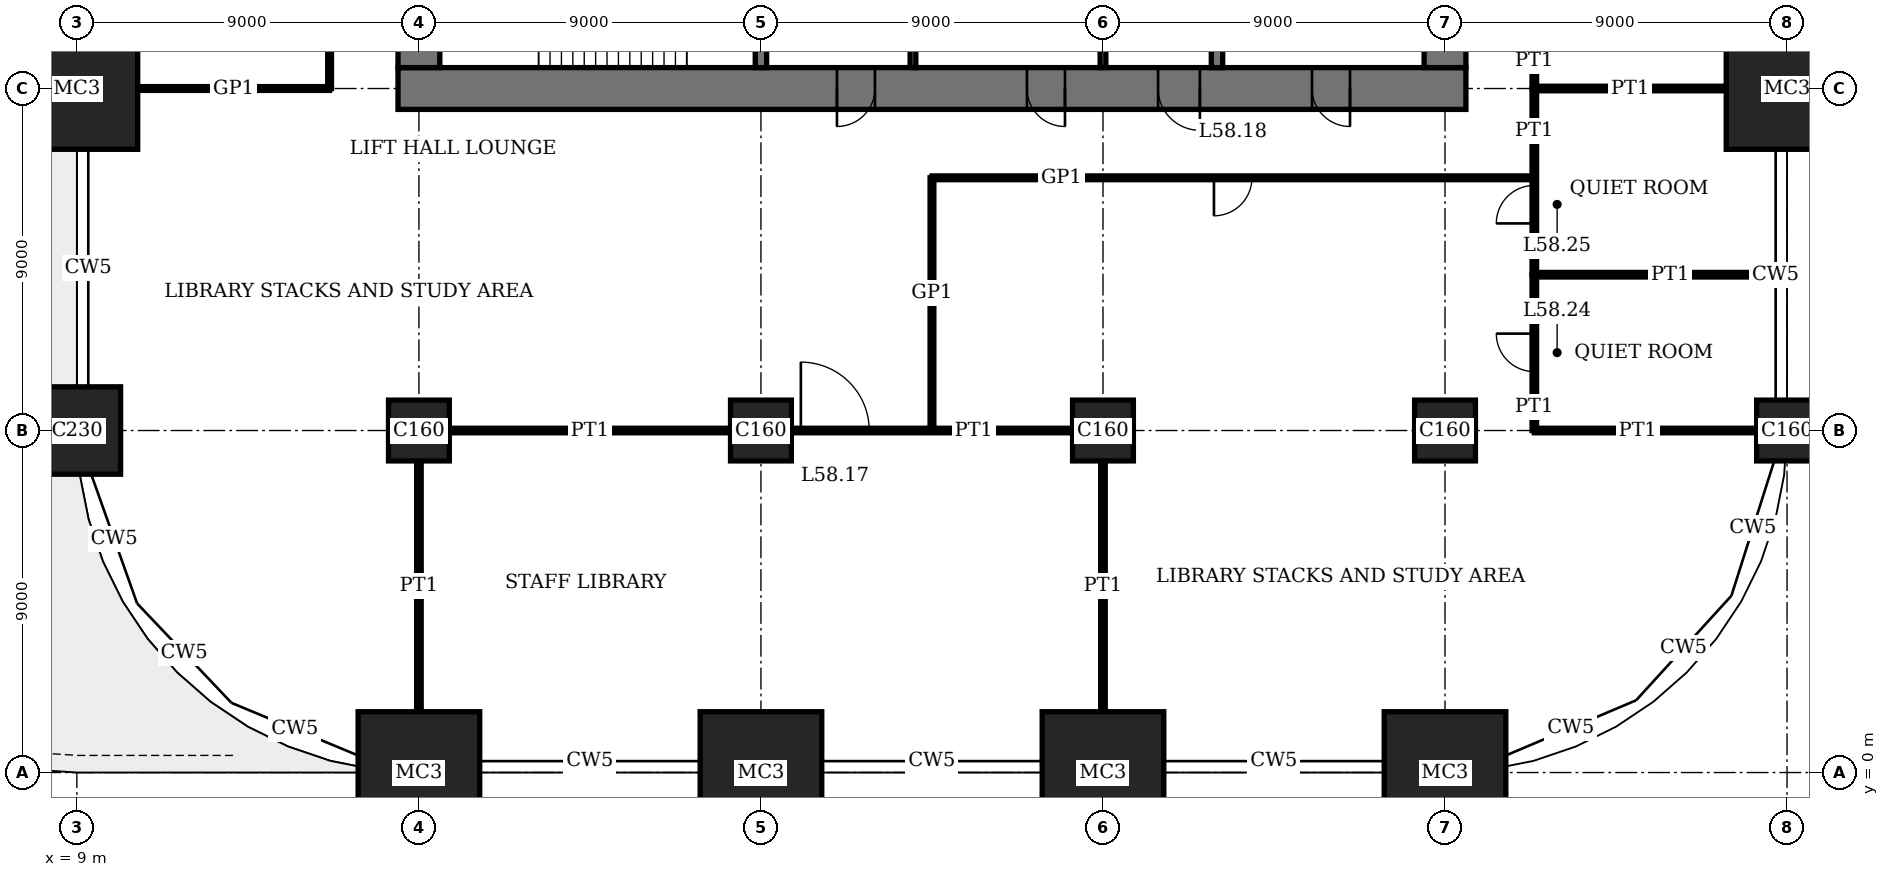
"""IFC4 building model, lengths in metres.
Left out: names, types, materials, properties, quantities, classifications, styles, units other than length and angle.
Written with IfcOpenShell. Run it as: python <this file> out.ifc"""

import sys

from ifc_helpers import new_model, si_unit, direction, frame, frame_2d, origin, origin_2d, place, context, subcontext, project, spatial, rectangle, extrude, element, fill, save


model = new_model("IFC4")
c1 = context("Model", 3, precision=1e-05, world=origin(), true_north=direction((0.0, 1.0)))
c2 = subcontext(c1, "Body", "Model", "MODEL_VIEW")
j1 = project(units=[si_unit("LENGTHUNIT", "METRE"), si_unit("PLANEANGLEUNIT", "RADIAN")], contexts=[c1])
p1 = place(None, origin())
s1 = spatial("IfcSite", under=j1, at=p1, CompositionType="ELEMENT")
p2 = place(p1, origin())
s2 = spatial("IfcBuilding", under=s1, at=p2, CompositionType="ELEMENT")
p3 = place(p2, frame((0.0, 0.0, 239.4)))
s3 = spatial("IfcBuildingStorey", under=s2, at=p3, CompositionType="ELEMENT", Elevation=239.4)
p4 = place(p3, frame((9.0, 9.0, 0.0), z_axis=(0.0, 0.0, 1.0), x_axis=(1.0, 0.0, 0.0)))
e1 = element("IfcColumn", 1, at=p4, inside=s3, PredefinedType="COLUMN", context=c2, shape_type="SweptSolid", body=[
    extrude(rectangle(XDim=2.3, YDim=2.3, at=origin_2d()), origin(), (0.0, 0.0, 1.0), 4.0),
])
for number, where, z_axis, x_axis in (
    (2, (9.0, 18.0, 0.0), (0.0, 0.0, 1.0), (1.0, 0.0, 0.0)),
    (3, (18.0, 0.0, 0.0), (0.0, 0.0, 1.0), (1.0, 0.0, 0.0)),
):
    element("IfcColumn", number, at=place(p3, frame(where, z_axis=z_axis, x_axis=x_axis)), inside=s3, PredefinedType="COLUMN", context=c2, shape_type="SweptSolid", body=[
        extrude(rectangle(XDim=3.2, YDim=3.2, at=origin_2d()), origin(), (0.0, 0.0, 1.0), 4.0),
    ])
p5 = place(p3, frame((18.0, 9.0, 0.0), z_axis=(0.0, 0.0, 1.0), x_axis=(1.0, 0.0, 0.0)))
e4 = element("IfcColumn", 4, at=p5, inside=s3, PredefinedType="COLUMN", context=c2, shape_type="SweptSolid", body=[
    extrude(rectangle(XDim=1.6, YDim=1.6, at=origin_2d()), origin(), (0.0, 0.0, 1.0), 4.0),
])
p6 = place(p3, frame((27.0, 0.0, 0.0), z_axis=(0.0, 0.0, 1.0), x_axis=(1.0, 0.0, 0.0)))
e5 = element("IfcColumn", 5, at=p6, inside=s3, PredefinedType="COLUMN", context=c2, shape_type="SweptSolid", body=[
    extrude(rectangle(XDim=3.2, YDim=3.2, at=origin_2d()), origin(), (0.0, 0.0, 1.0), 4.0),
])
p7 = place(p3, frame((27.0, 9.0, 0.0), z_axis=(0.0, 0.0, 1.0), x_axis=(1.0, 0.0, 0.0)))
e6 = element("IfcColumn", 6, at=p7, inside=s3, PredefinedType="COLUMN", context=c2, shape_type="SweptSolid", body=[
    extrude(rectangle(XDim=1.6, YDim=1.6, at=origin_2d()), origin(), (0.0, 0.0, 1.0), 4.0),
])
p8 = place(p3, frame((36.0, 0.0, 0.0), z_axis=(0.0, 0.0, 1.0), x_axis=(1.0, 0.0, 0.0)))
e7 = element("IfcColumn", 7, at=p8, inside=s3, PredefinedType="COLUMN", context=c2, shape_type="SweptSolid", body=[
    extrude(rectangle(XDim=3.2, YDim=3.2, at=origin_2d()), origin(), (0.0, 0.0, 1.0), 4.0),
])
p9 = place(p3, frame((36.0, 9.0, 0.0), z_axis=(0.0, 0.0, 1.0), x_axis=(1.0, 0.0, 0.0)))
e8 = element("IfcColumn", 8, at=p9, inside=s3, PredefinedType="COLUMN", context=c2, shape_type="SweptSolid", body=[
    extrude(rectangle(XDim=1.6, YDim=1.6, at=origin_2d()), origin(), (0.0, 0.0, 1.0), 4.0),
])
p10 = place(p3, frame((45.0, 0.0, 0.0), z_axis=(0.0, 0.0, 1.0), x_axis=(1.0, 0.0, 0.0)))
e9 = element("IfcColumn", 9, at=p10, inside=s3, PredefinedType="COLUMN", context=c2, shape_type="SweptSolid", body=[
    extrude(rectangle(XDim=3.2, YDim=3.2, at=origin_2d()), origin(), (0.0, 0.0, 1.0), 4.0),
])
for number, where, z_axis, x_axis in (
    (10, (45.0, 9.0, 0.0), (0.0, 0.0, 1.0), (1.0, 0.0, 0.0)),
    (11, (54.0, 9.0, 0.0), (0.0, 0.0, 1.0), (1.0, 0.0, 0.0)),
):
    element("IfcColumn", number, at=place(p3, frame(where, z_axis=z_axis, x_axis=x_axis)), inside=s3, PredefinedType="COLUMN", context=c2, shape_type="SweptSolid", body=[
        extrude(rectangle(XDim=1.6, YDim=1.6, at=origin_2d()), origin(), (0.0, 0.0, 1.0), 4.0),
    ])
p11 = place(p3, frame((54.0, 18.0, 0.0), z_axis=(0.0, 0.0, 1.0), x_axis=(1.0, 0.0, 0.0)))
e12 = element("IfcColumn", 12, at=p11, inside=s3, PredefinedType="COLUMN", context=c2, shape_type="SweptSolid", body=[
    extrude(rectangle(XDim=3.2, YDim=3.2, at=origin_2d()), origin(), (0.0, 0.0, 1.0), 4.0),
])
p12 = place(p3, frame((17.45, 18.0, 0.0), z_axis=(0.0, 0.0, 1.0), x_axis=(1.0, 0.0, 0.0)))
e13 = element("IfcWall", 13, at=p12, inside=s3, PredefinedType="SHEAR", context=c2, shape_type="SweptSolid", body=[
    extrude(rectangle(XDim=28.1, YDim=1.1, at=frame_2d((14.05, 0.0))), origin(), (0.0, 0.0, 1.0), 4.0),
])
p13 = place(p12, frame((11.55, 0.0, 0.0)))
e14 = element("IfcOpeningElement", 14, at=p13, cuts=e13, PredefinedType="OPENING", context=c2, shape_type="SweptSolid", body=[
    extrude(rectangle(XDim=1.0, YDim=2.4, at=frame_2d((0.5, 1.2))), frame((0.0, 0.56, 0.0), z_axis=(0.0, -1.0, 0.0), x_axis=(1.0, 0.0, 0.0)), (0.0, 0.0, 1.0), 1.12),
])
p14 = place(p12, frame((16.55, 0.0, 0.0)))
e15 = element("IfcOpeningElement", 15, at=p14, cuts=e13, PredefinedType="OPENING", context=c2, shape_type="SweptSolid", body=[
    extrude(rectangle(XDim=1.0, YDim=2.4, at=frame_2d((0.5, 1.2))), frame((0.0, 0.56, 0.0), z_axis=(0.0, -1.0, 0.0), x_axis=(1.0, 0.0, 0.0)), (0.0, 0.0, 1.0), 1.12),
])
p15 = place(p12, frame((20.0, 0.0, 0.0)))
e16 = element("IfcOpeningElement", 16, at=p15, cuts=e13, PredefinedType="OPENING", context=c2, shape_type="SweptSolid", body=[
    extrude(rectangle(XDim=1.1, YDim=2.4, at=frame_2d((0.55, 1.2))), frame((0.0, 0.56, 0.0), z_axis=(0.0, -1.0, 0.0), x_axis=(1.0, 0.0, 0.0)), (0.0, 0.0, 1.0), 1.12),
])
p16 = place(p12, frame((24.05, 0.0, 0.0)))
e17 = element("IfcOpeningElement", 17, at=p16, cuts=e13, PredefinedType="OPENING", context=c2, shape_type="SweptSolid", body=[
    extrude(rectangle(XDim=1.0, YDim=2.4, at=frame_2d((0.5, 1.2))), frame((0.0, 0.56, 0.0), z_axis=(0.0, -1.0, 0.0), x_axis=(1.0, 0.0, 0.0)), (0.0, 0.0, 1.0), 1.12),
])
p17 = place(p3, frame((18.0, 35.45, 0.0), z_axis=(0.0, 0.0, 1.0), x_axis=(0.0, -1.0, 0.0)))
e18 = element("IfcWall", 18, at=p17, inside=s3, PredefinedType="SHEAR", context=c2, shape_type="SweptSolid", body=[
    extrude(rectangle(XDim=16.9, YDim=1.1, at=frame_2d((8.45, 0.0))), origin(), (0.0, 0.0, 1.0), 4.0),
])
p18 = place(p17, frame((8.9, 0.0, 0.0)))
e19 = element("IfcOpeningElement", 19, at=p18, cuts=e18, PredefinedType="OPENING", context=c2, shape_type="SweptSolid", body=[
    extrude(rectangle(XDim=1.8, YDim=2.4, at=frame_2d((0.9, 1.2))), frame((0.0, 0.56, 0.0), z_axis=(0.0, -1.0, 0.0), x_axis=(1.0, 0.0, 0.0)), (0.0, 0.0, 1.0), 1.12),
])
p19 = place(p3, frame((45.0, 18.55, 0.0), z_axis=(0.0, 0.0, 1.0), x_axis=(0.0, 1.0, 0.0)))
e20 = element("IfcWall", 20, at=p19, inside=s3, PredefinedType="SHEAR", context=c2, shape_type="SweptSolid", body=[
    extrude(rectangle(XDim=16.9, YDim=1.1, at=frame_2d((8.45, 0.0))), origin(), (0.0, 0.0, 1.0), 4.0),
])
p20 = place(p19, frame((8.9, 0.0, 0.0)))
e21 = element("IfcOpeningElement", 21, at=p20, cuts=e20, PredefinedType="OPENING", context=c2, shape_type="SweptSolid", body=[
    extrude(rectangle(XDim=1.8, YDim=2.4, at=frame_2d((0.9, 1.2))), frame((0.0, 0.56, 0.0), z_axis=(0.0, -1.0, 0.0), x_axis=(1.0, 0.0, 0.0)), (0.0, 0.0, 1.0), 1.12),
])
p21 = place(p3, frame((27.0, 18.55, 0.0), z_axis=(0.0, 0.0, 1.0), x_axis=(0.0, 1.0, 0.0)))
e22 = element("IfcWall", 22, at=p21, inside=s3, PredefinedType="SHEAR", context=c2, shape_type="SweptSolid", body=[
    extrude(rectangle(XDim=3.05, YDim=0.3, at=frame_2d((1.525, 0.0))), origin(), (0.0, 0.0, 1.0), 4.0),
])
p22 = place(p3, frame((39.0, 18.55, 0.0), z_axis=(0.0, 0.0, 1.0), x_axis=(0.0, 1.0, 0.0)))
e23 = element("IfcWall", 23, at=p22, inside=s3, PredefinedType="SHEAR", context=c2, shape_type="SweptSolid", body=[
    extrude(rectangle(XDim=5.9, YDim=0.3, at=frame_2d((2.95, 0.0))), origin(), (0.0, 0.0, 1.0), 4.0),
])
p23 = place(p3, frame((18.8, 9.0, 0.0), z_axis=(0.0, 0.0, 1.0), x_axis=(1.0, 0.0, 0.0)))
e24 = element("IfcWall", 24, at=p23, inside=s3, PredefinedType="PARTITIONING", context=c2, shape_type="SweptSolid", body=[
    extrude(rectangle(XDim=7.4, YDim=0.12, at=frame_2d((3.7, 0.0))), origin(), (0.0, 0.0, 1.0), 3.05),
])
p24 = place(p3, frame((27.8, 9.0, 0.0), z_axis=(0.0, 0.0, 1.0), x_axis=(1.0, 0.0, 0.0)))
e25 = element("IfcWall", 25, at=p24, inside=s3, PredefinedType="PARTITIONING", context=c2, shape_type="SweptSolid", body=[
    extrude(rectangle(XDim=7.4, YDim=0.12, at=frame_2d((3.7, 0.0))), origin(), (0.0, 0.0, 1.0), 3.05),
])
p25 = place(p24, frame((0.25, 0.0, 0.0)))
e26 = element("IfcOpeningElement", 26, at=p25, cuts=e25, PredefinedType="OPENING", context=c2, shape_type="SweptSolid", body=[
    extrude(rectangle(XDim=1.8, YDim=2.4, at=frame_2d((0.9, 1.2))), frame((0.0, 0.07, 0.0), z_axis=(0.0, -1.0, 0.0), x_axis=(1.0, 0.0, 0.0)), (0.0, 0.0, 1.0), 0.14),
])
p26 = place(p3, frame((47.35, 9.0, 0.0), z_axis=(0.0, 0.0, 1.0), x_axis=(1.0, 0.0, 0.0)))
e27 = element("IfcWall", 27, at=p26, inside=s3, PredefinedType="PARTITIONING", context=c2, shape_type="SweptSolid", body=[
    extrude(rectangle(XDim=5.85, YDim=0.12, at=frame_2d((2.925, 0.0))), origin(), (0.0, 0.0, 1.0), 3.05),
])
p27 = place(p3, frame((47.35, 13.1, 0.0), z_axis=(0.0, 0.0, 1.0), x_axis=(1.0, 0.0, 0.0)))
e28 = element("IfcWall", 28, at=p27, inside=s3, PredefinedType="PARTITIONING", context=c2, shape_type="SweptSolid", body=[
    extrude(rectangle(XDim=6.34, YDim=0.12, at=frame_2d((3.17, 0.0))), origin(), (0.0, 0.0, 1.0), 3.75),
])
p28 = place(p3, frame((31.5, 15.65, 0.0), z_axis=(0.0, 0.0, 1.0), x_axis=(1.0, 0.0, 0.0)))
e29 = element("IfcWall", 29, at=p28, inside=s3, PredefinedType="PARTITIONING", context=c2, shape_type="SweptSolid", body=[
    extrude(rectangle(XDim=15.84, YDim=0.1, at=frame_2d((7.92, 0.0))), origin(), (0.0, 0.0, 1.0), 3.75),
])
p29 = place(p28, frame((7.42, 0.0, 0.0)))
e30 = element("IfcOpeningElement", 30, at=p29, cuts=e29, PredefinedType="OPENING", context=c2, shape_type="SweptSolid", body=[
    extrude(rectangle(XDim=1.0, YDim=2.4, at=frame_2d((0.5, 1.2))), frame((0.0, 0.06, 0.0), z_axis=(0.0, -1.0, 0.0), x_axis=(1.0, 0.0, 0.0)), (0.0, 0.0, 1.0), 0.12),
])
p30 = place(p3, frame((47.35, 18.0, 0.0), z_axis=(0.0, 0.0, 1.0), x_axis=(1.0, 0.0, 0.0)))
e31 = element("IfcWall", 31, at=p30, inside=s3, PredefinedType="PARTITIONING", context=c2, shape_type="SweptSolid", body=[
    extrude(rectangle(XDim=5.05, YDim=0.12, at=frame_2d((2.525, 0.0))), origin(), (0.0, 0.0, 1.0), 3.05),
])
p31 = place(p3, frame((10.6, 18.0, 0.0), z_axis=(0.0, 0.0, 1.0), x_axis=(1.0, 0.0, 0.0)))
e32 = element("IfcWall", 32, at=p31, inside=s3, PredefinedType="PARTITIONING", context=c2, shape_type="SweptSolid", body=[
    extrude(rectangle(XDim=5.05, YDim=0.1, at=frame_2d((2.525, 0.0))), origin(), (0.0, 0.0, 1.0), 3.05),
])
p32 = place(p3, frame((15.65, 18.0, 0.0), z_axis=(0.0, 0.0, 1.0), x_axis=(0.0, 1.0, 0.0)))
e33 = element("IfcWall", 33, at=p32, inside=s3, PredefinedType="PARTITIONING", context=c2, shape_type="SweptSolid", body=[
    extrude(rectangle(XDim=9.0, YDim=0.1, at=frame_2d((4.5, 0.0))), origin(), (0.0, 0.0, 1.0), 3.75),
])
p33 = place(p32, frame((4.0, 0.0, 0.0)))
e34 = element("IfcOpeningElement", 34, at=p33, cuts=e33, PredefinedType="OPENING", context=c2, shape_type="SweptSolid", body=[
    extrude(rectangle(XDim=1.0, YDim=2.4, at=frame_2d((0.5, 1.2))), frame((0.0, 0.06, 0.0), z_axis=(0.0, -1.0, 0.0), x_axis=(1.0, 0.0, 0.0)), (0.0, 0.0, 1.0), 0.12),
])
p34 = place(p3, frame((18.0, 1.6, 0.0), z_axis=(0.0, 0.0, 1.0), x_axis=(0.0, 1.0, 0.0)))
e35 = element("IfcWall", 35, at=p34, inside=s3, PredefinedType="PARTITIONING", context=c2, shape_type="SweptSolid", body=[
    extrude(rectangle(XDim=6.6, YDim=0.12, at=frame_2d((3.3, 0.0))), origin(), (0.0, 0.0, 1.0), 3.05),
])
p35 = place(p3, frame((31.5, 8.99, 0.0), z_axis=(0.0, 0.0, 1.0), x_axis=(0.0, 1.0, 0.0)))
e36 = element("IfcWall", 36, at=p35, inside=s3, PredefinedType="PARTITIONING", context=c2, shape_type="SweptSolid", body=[
    extrude(rectangle(XDim=6.66, YDim=0.1, at=frame_2d((3.33, 0.0))), origin(), (0.0, 0.0, 1.0), 3.75),
])
p36 = place(p3, frame((36.0, 1.6, 0.0), z_axis=(0.0, 0.0, 1.0), x_axis=(0.0, 1.0, 0.0)))
e37 = element("IfcWall", 37, at=p36, inside=s3, PredefinedType="PARTITIONING", context=c2, shape_type="SweptSolid", body=[
    extrude(rectangle(XDim=6.6, YDim=0.12, at=frame_2d((3.3, 0.0))), origin(), (0.0, 0.0, 1.0), 3.05),
])
p37 = place(p3, frame((47.35, 9.0, 0.0), z_axis=(0.0, 0.0, 1.0), x_axis=(0.0, 1.0, 0.0)))
e38 = element("IfcWall", 38, at=p37, inside=s3, PredefinedType="PARTITIONING", context=c2, shape_type="SweptSolid", body=[
    extrude(rectangle(XDim=4.1, YDim=0.12, at=frame_2d((2.05, 0.0))), origin(), (0.0, 0.0, 1.0), 3.75),
])
p38 = place(p37, frame((1.55, 0.0, 0.0)))
e39 = element("IfcOpeningElement", 39, at=p38, cuts=e38, PredefinedType="OPENING", context=c2, shape_type="SweptSolid", body=[
    extrude(rectangle(XDim=1.0, YDim=2.4, at=frame_2d((0.5, 1.2))), frame((0.0, 0.07, 0.0), z_axis=(0.0, -1.0, 0.0), x_axis=(1.0, 0.0, 0.0)), (0.0, 0.0, 1.0), 0.14),
])
p39 = place(p3, frame((47.35, 13.1, 0.0), z_axis=(0.0, 0.0, 1.0), x_axis=(0.0, 1.0, 0.0)))
e40 = element("IfcWall", 40, at=p39, inside=s3, PredefinedType="PARTITIONING", context=c2, shape_type="SweptSolid", body=[
    extrude(rectangle(XDim=4.9, YDim=0.12, at=frame_2d((2.45, 0.0))), origin(), (0.0, 0.0, 1.0), 3.75),
])
p40 = place(p39, frame((1.35, 0.0, 0.0)))
e41 = element("IfcOpeningElement", 41, at=p40, cuts=e40, PredefinedType="OPENING", context=c2, shape_type="SweptSolid", body=[
    extrude(rectangle(XDim=1.0, YDim=2.4, at=frame_2d((0.5, 1.2))), frame((0.0, 0.07, 0.0), z_axis=(0.0, -1.0, 0.0), x_axis=(1.0, 0.0, 0.0)), (0.0, 0.0, 1.0), 0.14),
])
p41 = place(p3, frame((47.35, 18.0, 0.0), z_axis=(0.0, 0.0, 1.0), x_axis=(0.0, 1.0, 0.0)))
e42 = element("IfcWall", 42, at=p41, inside=s3, PredefinedType="PARTITIONING", context=c2, shape_type="SweptSolid", body=[
    extrude(rectangle(XDim=4.5, YDim=0.12, at=frame_2d((2.25, 0.0))), origin(), (0.0, 0.0, 1.0), 3.75),
])
p42 = place(p41, frame((1.75, 0.0, 0.0)))
e43 = element("IfcOpeningElement", 43, at=p42, cuts=e42, PredefinedType="OPENING", context=c2, shape_type="SweptSolid", body=[
    extrude(rectangle(XDim=1.0, YDim=2.4, at=frame_2d((0.5, 1.2))), frame((0.0, 0.07, 0.0), z_axis=(0.0, -1.0, 0.0), x_axis=(1.0, 0.0, 0.0)), (0.0, 0.0, 1.0), 0.14),
])
for number, where, z_axis, x_axis in (
    (44, (31.0, 18.55, 0.0), (0.0, 0.0, 1.0), (0.0, 1.0, 0.0)),
    (45, (36.0, 18.55, 0.0), (0.0, 0.0, 1.0), (0.0, 1.0, 0.0)),
):
    element("IfcWall", number, at=place(p3, frame(where, z_axis=z_axis, x_axis=x_axis)), inside=s3, PredefinedType="PARTITIONING", context=c2, shape_type="SweptSolid", body=[
        extrude(rectangle(XDim=2.9, YDim=0.15, at=frame_2d((1.45, 0.0))), origin(), (0.0, 0.0, 1.0), 3.75),
    ])
p43 = place(p13, origin())
e46 = element("IfcDoor", 46, at=p43, inside=s3, OperationType="SINGLE_SWING_LEFT", PredefinedType="DOOR", context=c2, shape_type="SweptSolid", body=[
    extrude(rectangle(XDim=1.0, YDim=2.4, at=frame_2d((0.5, 1.2))), frame((0.0, 0.025, 0.0), z_axis=(0.0, -1.0, 0.0), x_axis=(1.0, 0.0, 0.0)), (0.0, 0.0, 1.0), 0.05),
    extrude(rectangle(XDim=0.04, YDim=2.4, at=frame_2d((0.02, 1.2))), frame((0.0, 0.4, 0.0), z_axis=(0.0, -1.0, 0.0), x_axis=(1.0, 0.0, 0.0)), (0.0, 0.0, 1.0), 0.8),
    extrude(rectangle(XDim=0.04, YDim=2.4, at=frame_2d((0.98, 1.2))), frame((0.0, 0.4, 0.0), z_axis=(0.0, -1.0, 0.0), x_axis=(1.0, 0.0, 0.0)), (0.0, 0.0, 1.0), 0.8),
    extrude(rectangle(XDim=1.0, YDim=0.04, at=frame_2d((0.5, 2.38))), frame((0.0, 0.4, 0.0), z_axis=(0.0, -1.0, 0.0), x_axis=(1.0, 0.0, 0.0)), (0.0, 0.0, 1.0), 0.8),
])
fill(e14, e46)
p44 = place(p14, origin())
e47 = element("IfcDoor", 47, at=p44, inside=s3, OperationType="SINGLE_SWING_RIGHT", PredefinedType="DOOR", context=c2, shape_type="SweptSolid", body=[
    extrude(rectangle(XDim=1.0, YDim=2.4, at=frame_2d((0.5, 1.2))), frame((0.0, 0.025, 0.0), z_axis=(0.0, -1.0, 0.0), x_axis=(1.0, 0.0, 0.0)), (0.0, 0.0, 1.0), 0.05),
    extrude(rectangle(XDim=0.04, YDim=2.4, at=frame_2d((0.02, 1.2))), frame((0.0, 0.4, 0.0), z_axis=(0.0, -1.0, 0.0), x_axis=(1.0, 0.0, 0.0)), (0.0, 0.0, 1.0), 0.8),
    extrude(rectangle(XDim=0.04, YDim=2.4, at=frame_2d((0.98, 1.2))), frame((0.0, 0.4, 0.0), z_axis=(0.0, -1.0, 0.0), x_axis=(1.0, 0.0, 0.0)), (0.0, 0.0, 1.0), 0.8),
    extrude(rectangle(XDim=1.0, YDim=0.04, at=frame_2d((0.5, 2.38))), frame((0.0, 0.4, 0.0), z_axis=(0.0, -1.0, 0.0), x_axis=(1.0, 0.0, 0.0)), (0.0, 0.0, 1.0), 0.8),
])
fill(e15, e47)
p45 = place(p15, origin())
e48 = element("IfcDoor", 48, at=p45, inside=s3, OperationType="SINGLE_SWING_RIGHT", PredefinedType="DOOR", context=c2, shape_type="SweptSolid", body=[
    extrude(rectangle(XDim=1.1, YDim=2.4, at=frame_2d((0.55, 1.2))), frame((0.0, 0.025, 0.0), z_axis=(0.0, -1.0, 0.0), x_axis=(1.0, 0.0, 0.0)), (0.0, 0.0, 1.0), 0.05),
    extrude(rectangle(XDim=0.04, YDim=2.4, at=frame_2d((0.02, 1.2))), frame((0.0, 0.44, 0.0), z_axis=(0.0, -1.0, 0.0), x_axis=(1.0, 0.0, 0.0)), (0.0, 0.0, 1.0), 0.88),
    extrude(rectangle(XDim=0.04, YDim=2.4, at=frame_2d((1.08, 1.2))), frame((0.0, 0.44, 0.0), z_axis=(0.0, -1.0, 0.0), x_axis=(1.0, 0.0, 0.0)), (0.0, 0.0, 1.0), 0.88),
    extrude(rectangle(XDim=1.1, YDim=0.04, at=frame_2d((0.55, 2.38))), frame((0.0, 0.44, 0.0), z_axis=(0.0, -1.0, 0.0), x_axis=(1.0, 0.0, 0.0)), (0.0, 0.0, 1.0), 0.88),
])
fill(e16, e48)
p46 = place(p16, origin())
e49 = element("IfcDoor", 49, at=p46, inside=s3, OperationType="SINGLE_SWING_RIGHT", PredefinedType="DOOR", context=c2, shape_type="SweptSolid", body=[
    extrude(rectangle(XDim=1.0, YDim=2.4, at=frame_2d((0.5, 1.2))), frame((0.0, 0.025, 0.0), z_axis=(0.0, -1.0, 0.0), x_axis=(1.0, 0.0, 0.0)), (0.0, 0.0, 1.0), 0.05),
    extrude(rectangle(XDim=0.04, YDim=2.4, at=frame_2d((0.02, 1.2))), frame((0.0, 0.4, 0.0), z_axis=(0.0, -1.0, 0.0), x_axis=(1.0, 0.0, 0.0)), (0.0, 0.0, 1.0), 0.8),
    extrude(rectangle(XDim=0.04, YDim=2.4, at=frame_2d((0.98, 1.2))), frame((0.0, 0.4, 0.0), z_axis=(0.0, -1.0, 0.0), x_axis=(1.0, 0.0, 0.0)), (0.0, 0.0, 1.0), 0.8),
    extrude(rectangle(XDim=1.0, YDim=0.04, at=frame_2d((0.5, 2.38))), frame((0.0, 0.4, 0.0), z_axis=(0.0, -1.0, 0.0), x_axis=(1.0, 0.0, 0.0)), (0.0, 0.0, 1.0), 0.8),
])
fill(e17, e49)
p47 = place(p25, origin())
e50 = element("IfcDoor", 50, at=p47, inside=s3, OperationType="DOUBLE_DOOR_SINGLE_SWING", PredefinedType="DOOR", context=c2, shape_type="SweptSolid", body=[
    extrude(rectangle(XDim=1.8, YDim=2.4, at=frame_2d((0.9, 1.2))), frame((0.0, 0.025, 0.0), z_axis=(0.0, -1.0, 0.0), x_axis=(1.0, 0.0, 0.0)), (0.0, 0.0, 1.0), 0.05),
])
fill(e26, e50)
p48 = place(p29, origin())
e51 = element("IfcDoor", 51, at=p48, inside=s3, OperationType="SINGLE_SWING_LEFT", PredefinedType="DOOR", context=c2, shape_type="SweptSolid", body=[
    extrude(rectangle(XDim=1.0, YDim=2.4, at=frame_2d((0.5, 1.2))), frame((0.0, 0.02, 0.0), z_axis=(0.0, -1.0, 0.0), x_axis=(1.0, 0.0, 0.0)), (0.0, 0.0, 1.0), 0.04),
])
fill(e30, e51)
p49 = place(p38, origin())
e52 = element("IfcDoor", 52, at=p49, inside=s3, OperationType="SINGLE_SWING_LEFT", PredefinedType="DOOR", context=c2, shape_type="SweptSolid", body=[
    extrude(rectangle(XDim=1.0, YDim=2.4, at=frame_2d((0.5, 1.2))), frame((0.0, 0.025, 0.0), z_axis=(0.0, -1.0, 0.0), x_axis=(1.0, 0.0, 0.0)), (0.0, 0.0, 1.0), 0.05),
])
fill(e39, e52)
p50 = place(p40, origin())
e53 = element("IfcDoor", 53, at=p50, inside=s3, OperationType="SINGLE_SWING_RIGHT", PredefinedType="DOOR", context=c2, shape_type="SweptSolid", body=[
    extrude(rectangle(XDim=1.0, YDim=2.4, at=frame_2d((0.5, 1.2))), frame((0.0, 0.025, 0.0), z_axis=(0.0, -1.0, 0.0), x_axis=(1.0, 0.0, 0.0)), (0.0, 0.0, 1.0), 0.05),
])
fill(e41, e53)
save(model, sys.argv[1])
